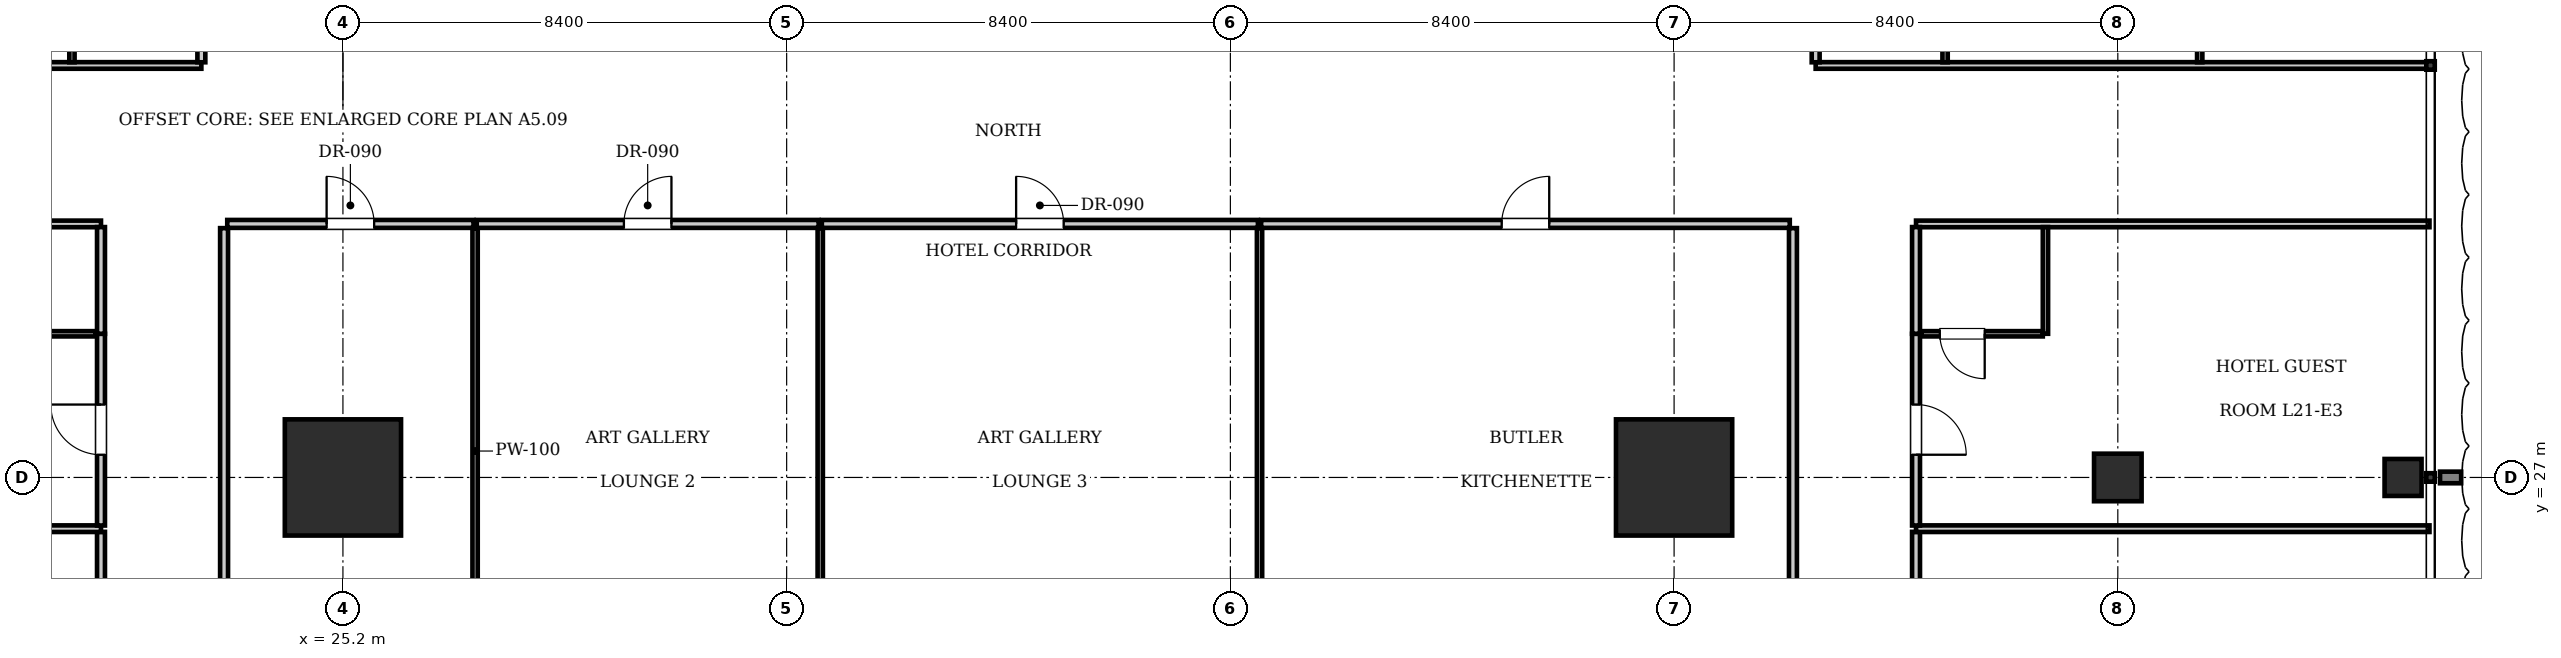
"""IFC4 building model, lengths in metres.
Left out: names, types, materials, properties, quantities, classifications, styles, units other than length and angle.
Written with IfcOpenShell. Run it as: python <this file> out.ifc"""

import sys

from ifc_helpers import new_model, si_unit, direction, frame, frame_2d, origin, origin_2d, place, context, subcontext, project, spatial, rectangle, i_section, extrude, element, fill, save


model = new_model("IFC4")
c1 = context("Model", 3, precision=1e-05, world=origin(), true_north=direction((0.0, 1.0)))
c2 = subcontext(c1, "Body", "Model", "MODEL_VIEW")
j1 = project(units=[si_unit("LENGTHUNIT", "METRE"), si_unit("PLANEANGLEUNIT", "RADIAN")], contexts=[c1])
p1 = place(None, origin())
s1 = spatial("IfcSite", under=j1, at=p1, CompositionType="ELEMENT")
p2 = place(p1, origin())
s2 = spatial("IfcBuilding", under=s1, at=p2, CompositionType="ELEMENT")
p3 = place(p2, frame((0.0, 0.0, 88.55)))
s3 = spatial("IfcBuildingStorey", under=s2, at=p3, CompositionType="ELEMENT", Elevation=88.55)
for number, where, z_axis, x_axis in (
    (1, (25.2, 27.0, 0.0), (0.0, 0.0, 1.0), (1.0, 0.0, 0.0)),
    (2, (50.4, 27.0, 0.0), (0.0, 0.0, 1.0), (1.0, 0.0, 0.0)),
):
    element("IfcColumn", number, at=place(p3, frame(where, z_axis=z_axis, x_axis=x_axis)), inside=s3, PredefinedType="COLUMN", context=c2, shape_type="SweptSolid", body=[
        extrude(rectangle(XDim=2.2, YDim=2.2, at=origin_2d()), origin(), (0.0, 0.0, 1.0), 3.85),
    ])
p4 = place(p3, frame((58.8, 27.0, 0.0), z_axis=(0.0, 0.0, 1.0), x_axis=(1.0, 0.0, 0.0)))
e3 = element("IfcColumn", 3, at=p4, inside=s3, PredefinedType="COLUMN", context=c2, shape_type="SweptSolid", body=[
    extrude(rectangle(XDim=0.9, YDim=0.9, at=origin_2d()), origin(), (0.0, 0.0, 1.0), 3.85),
])
p5 = place(p3, frame((64.2, 27.0, 0.0), z_axis=(0.0, 0.0, 1.0), x_axis=(1.0, 0.0, 0.0)))
e4 = element("IfcColumn", 4, at=p5, inside=s3, PredefinedType="COLUMN", context=c2, shape_type="SweptSolid", body=[
    extrude(i_section(OverallWidth=0.7, OverallDepth=0.7, WebThickness=0.028, FlangeThickness=0.044, at=origin_2d()), origin(), (0.0, 0.0, 1.0), 3.85),
])
for number, where, z_axis, x_axis in (
    (5, (22.95, 23.28, 0.0), (0.0, 0.0, 1.0), (0.0, 1.0, 0.0)),
    (6, (52.65, 23.28, 0.0), (0.0, 0.0, 1.0), (0.0, 1.0, 0.0)),
):
    element("IfcWall", number, at=place(p3, frame(where, z_axis=z_axis, x_axis=x_axis)), inside=s3, PredefinedType="PARTITIONING", context=c2, shape_type="SweptSolid", body=[
        extrude(rectangle(XDim=8.44, YDim=0.15, at=frame_2d((4.22, 0.0))), origin(), (0.0, 0.0, 1.0), 3.61),
    ])
p6 = place(p3, frame((23.01, 31.8, 0.0), z_axis=(0.0, 0.0, 1.0), x_axis=(1.0, 0.0, 0.0)))
e7 = element("IfcWall", 7, at=p6, inside=s3, PredefinedType="PARTITIONING", context=c2, shape_type="SweptSolid", body=[
    extrude(rectangle(XDim=4.662, YDim=0.15, at=frame_2d((2.331, 0.0))), origin(), (0.0, 0.0, 1.0), 3.61),
])
p7 = place(p6, frame((1.881, 0.0, 0.0)))
e8 = element("IfcOpeningElement", 8, at=p7, cuts=e7, PredefinedType="OPENING", context=c2, shape_type="SweptSolid", body=[
    extrude(rectangle(XDim=0.9, YDim=2.1, at=frame_2d((0.45, 1.05))), frame((0.0, 0.085, 0.0), z_axis=(0.0, -1.0, 0.0), x_axis=(1.0, 0.0, 0.0)), (0.0, 0.0, 1.0), 0.17),
])
p8 = place(p3, frame((27.702, 23.28, 0.0), z_axis=(0.0, 0.0, 1.0), x_axis=(0.0, 1.0, 0.0)))
e9 = element("IfcWall", 9, at=p8, inside=s3, PredefinedType="PARTITIONING", context=c2, shape_type="SweptSolid", body=[
    extrude(rectangle(XDim=8.44, YDim=0.1, at=frame_2d((4.22, 0.0))), origin(), (0.0, 0.0, 1.0), 3.61),
])
p9 = place(p3, frame((27.732, 31.8, 0.0), z_axis=(0.0, 0.0, 1.0), x_axis=(1.0, 0.0, 0.0)))
e10 = element("IfcWall", 10, at=p9, inside=s3, PredefinedType="PARTITIONING", context=c2, shape_type="SweptSolid", body=[
    extrude(rectangle(XDim=6.474, YDim=0.15, at=frame_2d((3.237, 0.0))), origin(), (0.0, 0.0, 1.0), 3.61),
])
p10 = place(p9, frame((2.787, 0.0, 0.0)))
e11 = element("IfcOpeningElement", 11, at=p10, cuts=e10, PredefinedType="OPENING", context=c2, shape_type="SweptSolid", body=[
    extrude(rectangle(XDim=0.9, YDim=2.1, at=frame_2d((0.45, 1.05))), frame((0.0, 0.085, 0.0), z_axis=(0.0, -1.0, 0.0), x_axis=(1.0, 0.0, 0.0)), (0.0, 0.0, 1.0), 0.17),
])
p11 = place(p3, frame((34.236, 23.28, 0.0), z_axis=(0.0, 0.0, 1.0), x_axis=(0.0, 1.0, 0.0)))
e12 = element("IfcWall", 12, at=p11, inside=s3, PredefinedType="PARTITIONING", context=c2, shape_type="SweptSolid", body=[
    extrude(rectangle(XDim=8.44, YDim=0.1, at=frame_2d((4.22, 0.0))), origin(), (0.0, 0.0, 1.0), 3.61),
])
p12 = place(p3, frame((34.266, 31.8, 0.0), z_axis=(0.0, 0.0, 1.0), x_axis=(1.0, 0.0, 0.0)))
e13 = element("IfcWall", 13, at=p12, inside=s3, PredefinedType="PARTITIONING", context=c2, shape_type="SweptSolid", body=[
    extrude(rectangle(XDim=8.256, YDim=0.15, at=frame_2d((4.128, 0.0))), origin(), (0.0, 0.0, 1.0), 3.61),
])
p13 = place(p12, frame((3.678, 0.0, 0.0)))
e14 = element("IfcOpeningElement", 14, at=p13, cuts=e13, PredefinedType="OPENING", context=c2, shape_type="SweptSolid", body=[
    extrude(rectangle(XDim=0.9, YDim=2.1, at=frame_2d((0.45, 1.05))), frame((0.0, 0.085, 0.0), z_axis=(0.0, -1.0, 0.0), x_axis=(1.0, 0.0, 0.0)), (0.0, 0.0, 1.0), 0.17),
])
p14 = place(p3, frame((42.552, 23.28, 0.0), z_axis=(0.0, 0.0, 1.0), x_axis=(0.0, 1.0, 0.0)))
e15 = element("IfcWall", 15, at=p14, inside=s3, PredefinedType="PARTITIONING", context=c2, shape_type="SweptSolid", body=[
    extrude(rectangle(XDim=8.44, YDim=0.1, at=frame_2d((4.22, 0.0))), origin(), (0.0, 0.0, 1.0), 3.61),
])
p15 = place(p3, frame((42.582, 31.8, 0.0), z_axis=(0.0, 0.0, 1.0), x_axis=(1.0, 0.0, 0.0)))
e16 = element("IfcWall", 16, at=p15, inside=s3, PredefinedType="PARTITIONING", context=c2, shape_type="SweptSolid", body=[
    extrude(rectangle(XDim=10.008, YDim=0.15, at=frame_2d((5.004, 0.0))), origin(), (0.0, 0.0, 1.0), 3.61),
])
p16 = place(p15, frame((4.554, 0.0, 0.0)))
e17 = element("IfcOpeningElement", 17, at=p16, cuts=e16, PredefinedType="OPENING", context=c2, shape_type="SweptSolid", body=[
    extrude(rectangle(XDim=0.9, YDim=2.1, at=frame_2d((0.45, 1.05))), frame((0.0, 0.085, 0.0), z_axis=(0.0, -1.0, 0.0), x_axis=(1.0, 0.0, 0.0)), (0.0, 0.0, 1.0), 0.17),
])
p17 = place(p3, frame((10.9, 31.8, 0.0), z_axis=(0.0, 0.0, 1.0), x_axis=(1.0, 0.0, 0.0)))
e18 = element("IfcWall", 18, at=p17, inside=s3, PredefinedType="PARTITIONING", context=c2, shape_type="SweptSolid", body=[
    extrude(rectangle(XDim=9.72, YDim=0.125, at=frame_2d((4.86, 0.0))), origin(), (0.0, 0.0, 1.0), 3.61),
])
p18 = place(p3, frame((54.98, 31.8, 0.0), z_axis=(0.0, 0.0, 1.0), x_axis=(1.0, 0.0, 0.0)))
e19 = element("IfcWall", 19, at=p18, inside=s3, PredefinedType="PARTITIONING", context=c2, shape_type="SweptSolid", body=[
    extrude(rectangle(XDim=9.72, YDim=0.125, at=frame_2d((4.86, 0.0))), origin(), (0.0, 0.0, 1.0), 3.61),
])
p19 = place(p3, frame((20.62, 22.34, 0.0), z_axis=(0.0, 0.0, 1.0), x_axis=(0.0, 1.0, 0.0)))
e20 = element("IfcWall", 20, at=p19, inside=s3, PredefinedType="PARTITIONING", context=c2, shape_type="SweptSolid", body=[
    extrude(rectangle(XDim=3.63, YDim=0.15, at=frame_2d((1.815, 0.0))), origin(), (0.0, 0.0, 1.0), 3.61),
])
p20 = place(p19, frame((1.34, 0.0, 0.0)))
e21 = element("IfcOpeningElement", 21, at=p20, cuts=e20, PredefinedType="OPENING", context=c2, shape_type="SweptSolid", body=[
    extrude(rectangle(XDim=0.95, YDim=2.15, at=frame_2d((0.475, 1.075))), frame((0.0, 0.085, 0.0), z_axis=(0.0, -1.0, 0.0), x_axis=(1.0, 0.0, 0.0)), (0.0, 0.0, 1.0), 0.17),
])
p21 = place(p3, frame((54.98, 22.34, 0.0), z_axis=(0.0, 0.0, 1.0), x_axis=(0.0, 1.0, 0.0)))
e22 = element("IfcWall", 22, at=p21, inside=s3, PredefinedType="PARTITIONING", context=c2, shape_type="SweptSolid", body=[
    extrude(rectangle(XDim=3.63, YDim=0.15, at=frame_2d((1.815, 0.0))), origin(), (0.0, 0.0, 1.0), 3.61),
])
p22 = place(p21, frame((1.34, 0.0, 0.0)))
e23 = element("IfcOpeningElement", 23, at=p22, cuts=e22, PredefinedType="OPENING", context=c2, shape_type="SweptSolid", body=[
    extrude(rectangle(XDim=0.95, YDim=2.15, at=frame_2d((0.475, 1.075))), frame((0.0, 0.085, 0.0), z_axis=(0.0, -1.0, 0.0), x_axis=(1.0, 0.0, 0.0)), (0.0, 0.0, 1.0), 0.17),
])
p23 = place(p3, frame((10.9, 26.03, 0.0), z_axis=(0.0, 0.0, 1.0), x_axis=(1.0, 0.0, 0.0)))
e24 = element("IfcWall", 24, at=p23, inside=s3, PredefinedType="PARTITIONING", context=c2, shape_type="SweptSolid", body=[
    extrude(rectangle(XDim=9.72, YDim=0.125, at=frame_2d((4.86, 0.0))), origin(), (0.0, 0.0, 1.0), 3.61),
])
p24 = place(p3, frame((54.98, 26.03, 0.0), z_axis=(0.0, 0.0, 1.0), x_axis=(1.0, 0.0, 0.0)))
e25 = element("IfcWall", 25, at=p24, inside=s3, PredefinedType="PARTITIONING", context=c2, shape_type="SweptSolid", body=[
    extrude(rectangle(XDim=9.72, YDim=0.125, at=frame_2d((4.86, 0.0))), origin(), (0.0, 0.0, 1.0), 3.61),
])
p25 = place(p3, frame((20.62, 26.09, 0.0), z_axis=(0.0, 0.0, 1.0), x_axis=(0.0, 1.0, 0.0)))
e26 = element("IfcWall", 26, at=p25, inside=s3, PredefinedType="PARTITIONING", context=c2, shape_type="SweptSolid", body=[
    extrude(rectangle(XDim=3.63, YDim=0.15, at=frame_2d((1.815, 0.0))), origin(), (0.0, 0.0, 1.0), 3.61),
])
p26 = place(p25, frame((1.34, 0.0, 0.0)))
e27 = element("IfcOpeningElement", 27, at=p26, cuts=e26, PredefinedType="OPENING", context=c2, shape_type="SweptSolid", body=[
    extrude(rectangle(XDim=0.95, YDim=2.15, at=frame_2d((0.475, 1.075))), frame((0.0, 0.085, 0.0), z_axis=(0.0, -1.0, 0.0), x_axis=(1.0, 0.0, 0.0)), (0.0, 0.0, 1.0), 0.17),
])
p27 = place(p3, frame((20.62, 29.72, 0.0), z_axis=(0.0, 0.0, 1.0), x_axis=(0.0, 1.0, 0.0)))
e28 = element("IfcWall", 28, at=p27, inside=s3, PredefinedType="PARTITIONING", context=c2, shape_type="SweptSolid", body=[
    extrude(rectangle(XDim=2.02, YDim=0.15, at=frame_2d((1.01, 0.0))), origin(), (0.0, 0.0, 1.0), 3.61),
])
p28 = place(p3, frame((18.22, 29.72, 0.0), z_axis=(0.0, 0.0, 1.0), x_axis=(1.0, 0.0, 0.0)))
e29 = element("IfcWall", 29, at=p28, inside=s3, PredefinedType="PARTITIONING", context=c2, shape_type="SweptSolid", body=[
    extrude(rectangle(XDim=2.3, YDim=0.1, at=frame_2d((1.15, 0.0))), origin(), (0.0, 0.0, 1.0), 3.61),
])
p29 = place(p28, frame((0.35, 0.0, 0.0)))
e30 = element("IfcOpeningElement", 30, at=p29, cuts=e29, PredefinedType="OPENING", context=c2, shape_type="SweptSolid", body=[
    extrude(rectangle(XDim=0.85, YDim=2.1, at=frame_2d((0.425, 1.05))), frame((0.0, 0.06, 0.0), z_axis=(0.0, -1.0, 0.0), x_axis=(1.0, 0.0, 0.0)), (0.0, 0.0, 1.0), 0.12),
])
p30 = place(p3, frame((54.98, 26.09, 0.0), z_axis=(0.0, 0.0, 1.0), x_axis=(0.0, 1.0, 0.0)))
e31 = element("IfcWall", 31, at=p30, inside=s3, PredefinedType="PARTITIONING", context=c2, shape_type="SweptSolid", body=[
    extrude(rectangle(XDim=3.63, YDim=0.15, at=frame_2d((1.815, 0.0))), origin(), (0.0, 0.0, 1.0), 3.61),
])
p31 = place(p30, frame((1.34, 0.0, 0.0)))
e32 = element("IfcOpeningElement", 32, at=p31, cuts=e31, PredefinedType="OPENING", context=c2, shape_type="SweptSolid", body=[
    extrude(rectangle(XDim=0.95, YDim=2.15, at=frame_2d((0.475, 1.075))), frame((0.0, 0.085, 0.0), z_axis=(0.0, -1.0, 0.0), x_axis=(1.0, 0.0, 0.0)), (0.0, 0.0, 1.0), 0.17),
])
p32 = place(p3, frame((54.98, 29.72, 0.0), z_axis=(0.0, 0.0, 1.0), x_axis=(0.0, 1.0, 0.0)))
e33 = element("IfcWall", 33, at=p32, inside=s3, PredefinedType="PARTITIONING", context=c2, shape_type="SweptSolid", body=[
    extrude(rectangle(XDim=2.02, YDim=0.15, at=frame_2d((1.01, 0.0))), origin(), (0.0, 0.0, 1.0), 3.61),
])
p33 = place(p3, frame((57.43, 29.72, 0.0), z_axis=(0.0, 0.0, 1.0), x_axis=(0.0, 1.0, 0.0)))
e34 = element("IfcWall", 34, at=p33, inside=s3, PredefinedType="PARTITIONING", context=c2, shape_type="SweptSolid", body=[
    extrude(rectangle(XDim=2.02, YDim=0.1, at=frame_2d((1.01, 0.0))), origin(), (0.0, 0.0, 1.0), 3.61),
])
p34 = place(p3, frame((55.08, 29.72, 0.0), z_axis=(0.0, 0.0, 1.0), x_axis=(1.0, 0.0, 0.0)))
e35 = element("IfcWall", 35, at=p34, inside=s3, PredefinedType="PARTITIONING", context=c2, shape_type="SweptSolid", body=[
    extrude(rectangle(XDim=2.3, YDim=0.1, at=frame_2d((1.15, 0.0))), origin(), (0.0, 0.0, 1.0), 3.61),
])
p35 = place(p34, frame((0.35, 0.0, 0.0)))
e36 = element("IfcOpeningElement", 36, at=p35, cuts=e35, PredefinedType="OPENING", context=c2, shape_type="SweptSolid", body=[
    extrude(rectangle(XDim=0.85, YDim=2.1, at=frame_2d((0.425, 1.05))), frame((0.0, 0.06, 0.0), z_axis=(0.0, -1.0, 0.0), x_axis=(1.0, 0.0, 0.0)), (0.0, 0.0, 1.0), 0.12),
])
p36 = place(p3, frame((10.9, 34.8, 0.0), z_axis=(0.0, 0.0, 1.0), x_axis=(1.0, 0.0, 0.0)))
e37 = element("IfcWall", 37, at=p36, inside=s3, PredefinedType="PARTITIONING", context=c2, shape_type="SweptSolid", body=[
    extrude(rectangle(XDim=11.62, YDim=0.125, at=frame_2d((5.81, 0.0))), origin(), (0.0, 0.0, 1.0), 3.61),
])
p37 = place(p3, frame((53.08, 34.8, 0.0), z_axis=(0.0, 0.0, 1.0), x_axis=(1.0, 0.0, 0.0)))
e38 = element("IfcWall", 38, at=p37, inside=s3, PredefinedType="PARTITIONING", context=c2, shape_type="SweptSolid", body=[
    extrude(rectangle(XDim=11.62, YDim=0.125, at=frame_2d((5.81, 0.0))), origin(), (0.0, 0.0, 1.0), 3.61),
])
p38 = place(p3, frame((22.52, 34.86, 0.0), z_axis=(0.0, 0.0, 1.0), x_axis=(0.0, 1.0, 0.0)))
e39 = element("IfcWall", 39, at=p38, inside=s3, PredefinedType="PARTITIONING", context=c2, shape_type="SweptSolid", body=[
    extrude(rectangle(XDim=2.29, YDim=0.15, at=frame_2d((1.145, 0.0))), origin(), (0.0, 0.0, 1.0), 3.61),
])
p39 = place(p3, frame((20.07, 34.86, 0.0), z_axis=(0.0, 0.0, 1.0), x_axis=(0.0, 1.0, 0.0)))
e40 = element("IfcWall", 40, at=p39, inside=s3, PredefinedType="PARTITIONING", context=c2, shape_type="SweptSolid", body=[
    extrude(rectangle(XDim=2.29, YDim=0.1, at=frame_2d((1.145, 0.0))), origin(), (0.0, 0.0, 1.0), 3.61),
])
p40 = place(p3, frame((53.08, 34.86, 0.0), z_axis=(0.0, 0.0, 1.0), x_axis=(0.0, 1.0, 0.0)))
e41 = element("IfcWall", 41, at=p40, inside=s3, PredefinedType="PARTITIONING", context=c2, shape_type="SweptSolid", body=[
    extrude(rectangle(XDim=2.29, YDim=0.15, at=frame_2d((1.145, 0.0))), origin(), (0.0, 0.0, 1.0), 3.61),
])
p41 = place(p3, frame((55.53, 34.86, 0.0), z_axis=(0.0, 0.0, 1.0), x_axis=(0.0, 1.0, 0.0)))
e42 = element("IfcWall", 42, at=p41, inside=s3, PredefinedType="PARTITIONING", context=c2, shape_type="SweptSolid", body=[
    extrude(rectangle(XDim=2.29, YDim=0.1, at=frame_2d((1.145, 0.0))), origin(), (0.0, 0.0, 1.0), 3.61),
])
p42 = place(p3, frame((60.35, 34.86, 0.0), z_axis=(0.0, 0.0, 1.0), x_axis=(0.0, 1.0, 0.0)))
e43 = element("IfcWall", 43, at=p42, inside=s3, PredefinedType="PARTITIONING", context=c2, shape_type="SweptSolid", body=[
    extrude(rectangle(XDim=7.649, YDim=0.1, at=frame_2d((3.824, 0.0))), origin(), (0.0, 0.0, 1.0), 3.61),
])
p43 = place(p42, frame((3.374, 0.0, 0.0)))
e44 = element("IfcOpeningElement", 44, at=p43, cuts=e43, PredefinedType="OPENING", context=c2, shape_type="SweptSolid", body=[
    extrude(rectangle(XDim=0.9, YDim=2.1, at=frame_2d((0.45, 1.05))), frame((0.0, 0.06, 0.0), z_axis=(0.0, -1.0, 0.0), x_axis=(1.0, 0.0, 0.0)), (0.0, 0.0, 1.0), 0.12),
])
p44 = place(p7, origin())
e45 = element("IfcDoor", 45, at=p44, inside=s3, OperationType="SINGLE_SWING_LEFT", PredefinedType="DOOR", context=c2, shape_type="SweptSolid", body=[
    extrude(rectangle(XDim=0.9, YDim=2.1, at=frame_2d((0.45, 1.05))), frame((0.0, 0.025, 0.0), z_axis=(0.0, -1.0, 0.0), x_axis=(1.0, 0.0, 0.0)), (0.0, 0.0, 1.0), 0.05),
])
fill(e8, e45)
p45 = place(p10, origin())
e46 = element("IfcDoor", 46, at=p45, inside=s3, OperationType="SINGLE_SWING_RIGHT", PredefinedType="DOOR", context=c2, shape_type="SweptSolid", body=[
    extrude(rectangle(XDim=0.9, YDim=2.1, at=frame_2d((0.45, 1.05))), frame((0.0, 0.025, 0.0), z_axis=(0.0, -1.0, 0.0), x_axis=(1.0, 0.0, 0.0)), (0.0, 0.0, 1.0), 0.05),
])
fill(e11, e46)
p46 = place(p13, origin())
e47 = element("IfcDoor", 47, at=p46, inside=s3, OperationType="SINGLE_SWING_LEFT", PredefinedType="DOOR", context=c2, shape_type="SweptSolid", body=[
    extrude(rectangle(XDim=0.9, YDim=2.1, at=frame_2d((0.45, 1.05))), frame((0.0, 0.025, 0.0), z_axis=(0.0, -1.0, 0.0), x_axis=(1.0, 0.0, 0.0)), (0.0, 0.0, 1.0), 0.05),
])
fill(e14, e47)
p47 = place(p16, origin())
e48 = element("IfcDoor", 48, at=p47, inside=s3, OperationType="SINGLE_SWING_RIGHT", PredefinedType="DOOR", context=c2, shape_type="SweptSolid", body=[
    extrude(rectangle(XDim=0.9, YDim=2.1, at=frame_2d((0.45, 1.05))), frame((0.0, 0.025, 0.0), z_axis=(0.0, -1.0, 0.0), x_axis=(1.0, 0.0, 0.0)), (0.0, 0.0, 1.0), 0.05),
])
fill(e17, e48)
p48 = place(p26, origin())
e49 = element("IfcDoor", 49, at=p48, inside=s3, OperationType="SINGLE_SWING_RIGHT", PredefinedType="DOOR", context=c2, shape_type="SweptSolid", body=[
    extrude(rectangle(XDim=0.95, YDim=2.15, at=frame_2d((0.475, 1.075))), frame((0.0, 0.025, 0.0), z_axis=(0.0, -1.0, 0.0), x_axis=(1.0, 0.0, 0.0)), (0.0, 0.0, 1.0), 0.05),
])
fill(e27, e49)
p49 = place(p35, frame((0.85, 0.0, 0.0), z_axis=(0.0, 0.0, 1.0), x_axis=(-1.0, 0.0, 0.0)))
e50 = element("IfcDoor", 50, at=p49, inside=s3, OperationType="SINGLE_SWING_LEFT", PredefinedType="DOOR", context=c2, shape_type="SweptSolid", body=[
    extrude(rectangle(XDim=0.85, YDim=2.1, at=frame_2d((0.425, 1.05))), frame((0.0, 0.025, 0.0), z_axis=(0.0, -1.0, 0.0), x_axis=(1.0, 0.0, 0.0)), (0.0, 0.0, 1.0), 0.05),
])
fill(e36, e50)
p50 = place(p31, frame((0.95, 0.0, 0.0), z_axis=(0.0, 0.0, 1.0), x_axis=(-1.0, 0.0, 0.0)))
e51 = element("IfcDoor", 51, at=p50, inside=s3, OperationType="SINGLE_SWING_RIGHT", PredefinedType="DOOR", context=c2, shape_type="SweptSolid", body=[
    extrude(rectangle(XDim=0.95, YDim=2.15, at=frame_2d((0.475, 1.075))), frame((0.0, 0.025, 0.0), z_axis=(0.0, -1.0, 0.0), x_axis=(1.0, 0.0, 0.0)), (0.0, 0.0, 1.0), 0.05),
])
fill(e32, e51)
save(model, sys.argv[1])
